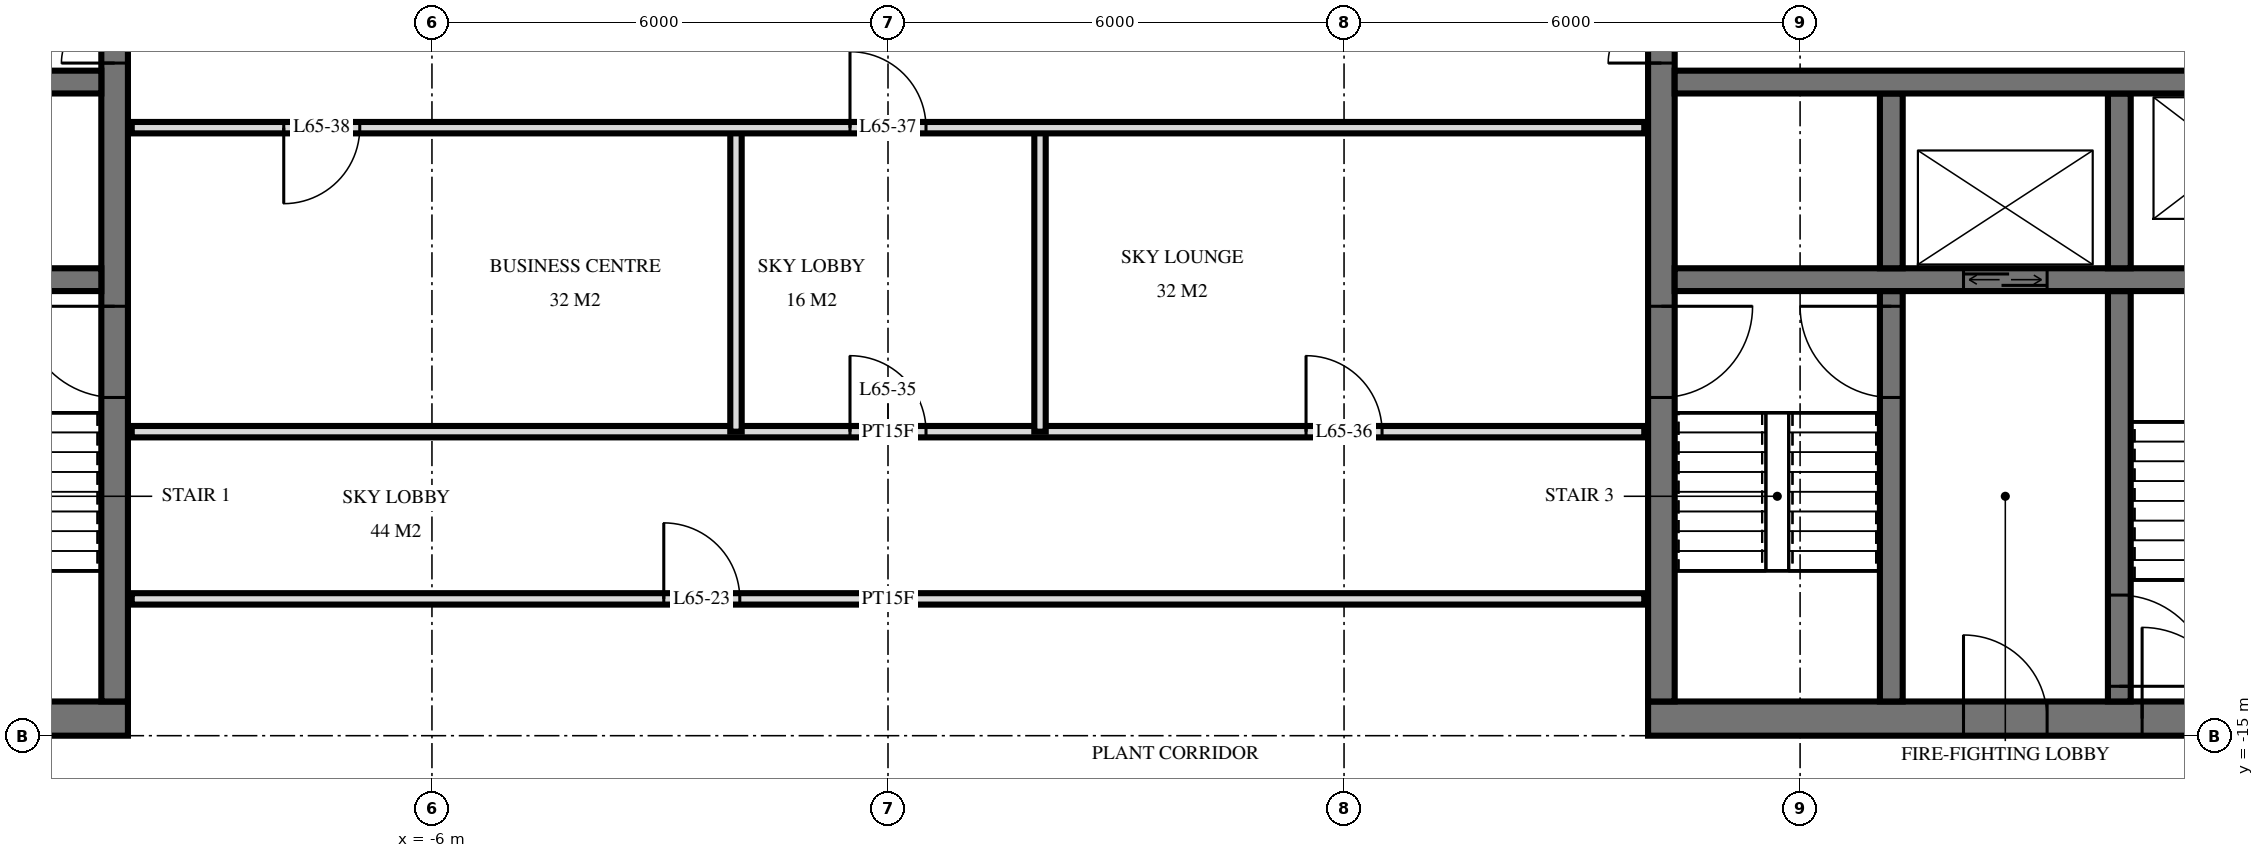
"""IFC4 building model, lengths in metres.
Left out: names, types, materials, properties, quantities, classifications, styles, units other than length and angle.
Written with IfcOpenShell. Run it as: python <this file> out.ifc"""

import sys

from ifc_helpers import new_model, si_unit, direction, frame, frame_2d, origin, place, context, subcontext, project, spatial, rectangle, extrude, element, fill, save


model = new_model("IFC4")
c1 = context("Model", 3, precision=1e-05, world=origin(), true_north=direction((0.0, 1.0)))
c2 = subcontext(c1, "Body", "Model", "MODEL_VIEW")
j1 = project(units=[si_unit("LENGTHUNIT", "METRE"), si_unit("PLANEANGLEUNIT", "RADIAN")], contexts=[c1])
p1 = place(None, origin())
s1 = spatial("IfcSite", under=j1, at=p1, CompositionType="ELEMENT")
p2 = place(p1, origin())
s2 = spatial("IfcBuilding", under=s1, at=p2, CompositionType="ELEMENT")
p3 = place(p2, frame((0.0, 0.0, 246.6)))
s3 = spatial("IfcBuildingStorey", under=s2, at=p3, CompositionType="ELEMENT", Elevation=246.6)
p4 = place(p3, frame((-19.5, -14.775, 0.0), z_axis=(0.0, 0.0, 1.0), x_axis=(1.0, 0.0, 0.0)))
e1 = element("IfcWall", 1, at=p4, inside=s3, PredefinedType="SHEAR", context=c2, shape_type="SweptSolid", body=[
    extrude(rectangle(XDim=9.5, YDim=0.45, at=frame_2d((4.75, 0.0))), origin(), (0.0, 0.0, 1.0), 6.0),
])
p5 = place(p4, frame((1.8, 0.0, 0.0)))
e2 = element("IfcOpeningElement", 2, at=p5, cuts=e1, PredefinedType="OPENING", context=c2, shape_type="SweptSolid", body=[
    extrude(rectangle(XDim=1.2, YDim=2.1, at=frame_2d((0.6, 1.05))), frame((0.0, 0.235, 0.0), z_axis=(0.0, -1.0, 0.0), x_axis=(1.0, 0.0, 0.0)), (0.0, 0.0, 1.0), 0.47),
])
p6 = place(p4, frame((4.25, 0.0, 0.0)))
e3 = element("IfcOpeningElement", 3, at=p6, cuts=e1, PredefinedType="OPENING", context=c2, shape_type="SweptSolid", body=[
    extrude(rectangle(XDim=1.1, YDim=2.1, at=frame_2d((0.55, 1.05))), frame((0.0, 0.235, 0.0), z_axis=(0.0, -1.0, 0.0), x_axis=(1.0, 0.0, 0.0)), (0.0, 0.0, 1.0), 0.47),
])
p7 = place(p3, frame((-10.175, -14.55, 0.0), z_axis=(0.0, 0.0, 1.0), x_axis=(0.0, 1.0, 0.0)))
e4 = element("IfcWall", 4, at=p7, inside=s3, PredefinedType="SHEAR", context=c2, shape_type="SweptSolid", body=[
    extrude(rectangle(XDim=14.1, YDim=0.35, at=frame_2d((7.05, 0.0))), origin(), (0.0, 0.0, 1.0), 6.0),
])
p8 = place(p7, frame((8.4, 0.0, 0.0)))
e5 = element("IfcOpeningElement", 5, at=p8, cuts=e4, PredefinedType="OPENING", context=c2, shape_type="SweptSolid", body=[
    extrude(rectangle(XDim=1.4, YDim=2.4, at=frame_2d((0.7, 1.2))), frame((0.0, 0.185, 0.0), z_axis=(0.0, -1.0, 0.0), x_axis=(1.0, 0.0, 0.0)), (0.0, 0.0, 1.0), 0.37),
])
p9 = place(p7, frame((10.0, 0.0, 0.0)))
e6 = element("IfcOpeningElement", 6, at=p9, cuts=e4, PredefinedType="OPENING", context=c2, shape_type="SweptSolid", body=[
    extrude(rectangle(XDim=1.4, YDim=2.4, at=frame_2d((0.7, 1.2))), frame((0.0, 0.185, 0.0), z_axis=(0.0, -1.0, 0.0), x_axis=(1.0, 0.0, 0.0)), (0.0, 0.0, 1.0), 0.37),
])
p10 = place(p7, frame((4.0, 0.0, 0.0)))
e7 = element("IfcOpeningElement", 7, at=p10, cuts=e4, PredefinedType="OPENING", context=c2, shape_type="SweptSolid", body=[
    extrude(rectangle(XDim=1.2, YDim=2.1, at=frame_2d((0.6, 1.05))), frame((0.0, 0.185, 0.0), z_axis=(0.0, -1.0, 0.0), x_axis=(1.0, 0.0, 0.0)), (0.0, 0.0, 1.0), 0.37),
])
p11 = place(p3, frame((-19.05, -6.4, 0.0), z_axis=(0.0, 0.0, 1.0), x_axis=(1.0, 0.0, 0.0)))
e8 = element("IfcWall", 8, at=p11, inside=s3, PredefinedType="SHEAR", context=c2, shape_type="SweptSolid", body=[
    extrude(rectangle(XDim=8.7, YDim=0.3, at=frame_2d((4.35, 0.0))), origin(), (0.0, 0.0, 1.0), 6.0),
])
p12 = place(p11, frame((0.8, 0.0, 0.0)))
e9 = element("IfcOpeningElement", 9, at=p12, cuts=e8, PredefinedType="OPENING", context=c2, shape_type="SweptSolid", body=[
    extrude(rectangle(XDim=1.1, YDim=2.1, at=frame_2d((0.55, 1.05))), frame((0.0, 0.16, 0.0), z_axis=(0.0, -1.0, 0.0), x_axis=(1.0, 0.0, 0.0)), (0.0, 0.0, 1.0), 0.32),
])
p13 = place(p3, frame((-19.05, -9.0, 0.0), z_axis=(0.0, 0.0, 1.0), x_axis=(1.0, 0.0, 0.0)))
e10 = element("IfcWall", 10, at=p13, inside=s3, PredefinedType="SHEAR", context=c2, shape_type="SweptSolid", body=[
    extrude(rectangle(XDim=8.7, YDim=0.3, at=frame_2d((4.35, 0.0))), origin(), (0.0, 0.0, 1.0), 6.0),
])
p14 = place(p13, frame((3.8, 0.0, 0.0)))
e11 = element("IfcOpeningElement", 11, at=p14, cuts=e10, PredefinedType="OPENING", context=c2, shape_type="SweptSolid", body=[
    extrude(rectangle(XDim=1.1, YDim=2.1, at=frame_2d((0.55, 1.05))), frame((0.0, 0.16, 0.0), z_axis=(0.0, -1.0, 0.0), x_axis=(1.0, 0.0, 0.0)), (0.0, 0.0, 1.0), 0.32),
])
p15 = place(p3, frame((10.0, -14.775, 0.0), z_axis=(0.0, 0.0, 1.0), x_axis=(1.0, 0.0, 0.0)))
e12 = element("IfcWall", 12, at=p15, inside=s3, PredefinedType="SHEAR", context=c2, shape_type="SweptSolid", body=[
    extrude(rectangle(XDim=9.5, YDim=0.45, at=frame_2d((4.75, 0.0))), origin(), (0.0, 0.0, 1.0), 6.0),
])
p16 = place(p15, frame((6.5, 0.0, 0.0)))
e13 = element("IfcOpeningElement", 13, at=p16, cuts=e12, PredefinedType="OPENING", context=c2, shape_type="SweptSolid", body=[
    extrude(rectangle(XDim=1.2, YDim=2.1, at=frame_2d((0.6, 1.05))), frame((0.0, 0.235, 0.0), z_axis=(0.0, -1.0, 0.0), x_axis=(1.0, 0.0, 0.0)), (0.0, 0.0, 1.0), 0.47),
])
p17 = place(p15, frame((4.15, 0.0, 0.0)))
e14 = element("IfcOpeningElement", 14, at=p17, cuts=e12, PredefinedType="OPENING", context=c2, shape_type="SweptSolid", body=[
    extrude(rectangle(XDim=1.1, YDim=2.1, at=frame_2d((0.55, 1.05))), frame((0.0, 0.235, 0.0), z_axis=(0.0, -1.0, 0.0), x_axis=(1.0, 0.0, 0.0)), (0.0, 0.0, 1.0), 0.47),
])
p18 = place(p3, frame((10.175, -14.55, 0.0), z_axis=(0.0, 0.0, 1.0), x_axis=(0.0, 1.0, 0.0)))
e15 = element("IfcWall", 15, at=p18, inside=s3, PredefinedType="SHEAR", context=c2, shape_type="SweptSolid", body=[
    extrude(rectangle(XDim=14.1, YDim=0.35, at=frame_2d((7.05, 0.0))), origin(), (0.0, 0.0, 1.0), 6.0),
])
p19 = place(p18, frame((8.4, 0.0, 0.0)))
e16 = element("IfcOpeningElement", 16, at=p19, cuts=e15, PredefinedType="OPENING", context=c2, shape_type="SweptSolid", body=[
    extrude(rectangle(XDim=1.4, YDim=2.4, at=frame_2d((0.7, 1.2))), frame((0.0, 0.185, 0.0), z_axis=(0.0, -1.0, 0.0), x_axis=(1.0, 0.0, 0.0)), (0.0, 0.0, 1.0), 0.37),
])
p20 = place(p18, frame((10.0, 0.0, 0.0)))
e17 = element("IfcOpeningElement", 17, at=p20, cuts=e15, PredefinedType="OPENING", context=c2, shape_type="SweptSolid", body=[
    extrude(rectangle(XDim=1.4, YDim=2.4, at=frame_2d((0.7, 1.2))), frame((0.0, 0.185, 0.0), z_axis=(0.0, -1.0, 0.0), x_axis=(1.0, 0.0, 0.0)), (0.0, 0.0, 1.0), 0.37),
])
p21 = place(p18, frame((4.0, 0.0, 0.0)))
e18 = element("IfcOpeningElement", 18, at=p21, cuts=e15, PredefinedType="OPENING", context=c2, shape_type="SweptSolid", body=[
    extrude(rectangle(XDim=1.2, YDim=2.1, at=frame_2d((0.6, 1.05))), frame((0.0, 0.185, 0.0), z_axis=(0.0, -1.0, 0.0), x_axis=(1.0, 0.0, 0.0)), (0.0, 0.0, 1.0), 0.37),
])
p22 = place(p3, frame((10.35, -6.4, 0.0), z_axis=(0.0, 0.0, 1.0), x_axis=(1.0, 0.0, 0.0)))
e19 = element("IfcWall", 19, at=p22, inside=s3, PredefinedType="SHEAR", context=c2, shape_type="SweptSolid", body=[
    extrude(rectangle(XDim=8.7, YDim=0.3, at=frame_2d((4.35, 0.0))), origin(), (0.0, 0.0, 1.0), 6.0),
])
p23 = place(p22, frame((6.8, 0.0, 0.0)))
e20 = element("IfcOpeningElement", 20, at=p23, cuts=e19, PredefinedType="OPENING", context=c2, shape_type="SweptSolid", body=[
    extrude(rectangle(XDim=1.1, YDim=2.1, at=frame_2d((0.55, 1.05))), frame((0.0, 0.16, 0.0), z_axis=(0.0, -1.0, 0.0), x_axis=(1.0, 0.0, 0.0)), (0.0, 0.0, 1.0), 0.32),
])
p24 = place(p3, frame((10.35, -9.0, 0.0), z_axis=(0.0, 0.0, 1.0), x_axis=(1.0, 0.0, 0.0)))
e21 = element("IfcWall", 21, at=p24, inside=s3, PredefinedType="SHEAR", context=c2, shape_type="SweptSolid", body=[
    extrude(rectangle(XDim=8.7, YDim=0.3, at=frame_2d((4.35, 0.0))), origin(), (0.0, 0.0, 1.0), 6.0),
])
p25 = place(p24, frame((3.8, 0.0, 0.0)))
e22 = element("IfcOpeningElement", 22, at=p25, cuts=e21, PredefinedType="OPENING", context=c2, shape_type="SweptSolid", body=[
    extrude(rectangle(XDim=1.1, YDim=2.1, at=frame_2d((0.55, 1.05))), frame((0.0, 0.16, 0.0), z_axis=(0.0, -1.0, 0.0), x_axis=(1.0, 0.0, 0.0)), (0.0, 0.0, 1.0), 0.32),
])
p26 = place(p3, frame((13.2, -8.85, 0.0), z_axis=(0.0, 0.0, 1.0), x_axis=(0.0, 1.0, 0.0)))
e23 = element("IfcWall", 23, at=p26, inside=s3, PredefinedType="SHEAR", context=c2, shape_type="SweptSolid", body=[
    extrude(rectangle(XDim=2.3, YDim=0.3, at=frame_2d((1.15, 0.0))), origin(), (0.0, 0.0, 1.0), 6.0),
])
p27 = place(p3, frame((13.2, -14.55, 0.0), z_axis=(0.0, 0.0, 1.0), x_axis=(0.0, 1.0, 0.0)))
e24 = element("IfcWall", 24, at=p27, inside=s3, PredefinedType="SHEAR", context=c2, shape_type="SweptSolid", body=[
    extrude(rectangle(XDim=5.4, YDim=0.3, at=frame_2d((2.7, 0.0))), origin(), (0.0, 0.0, 1.0), 6.0),
])
p28 = place(p27, frame((4.0, 0.0, 0.0)))
e25 = element("IfcOpeningElement", 25, at=p28, cuts=e24, PredefinedType="OPENING", context=c2, shape_type="SweptSolid", body=[
    extrude(rectangle(XDim=1.2, YDim=2.1, at=frame_2d((0.6, 1.05))), frame((0.0, 0.16, 0.0), z_axis=(0.0, -1.0, 0.0), x_axis=(1.0, 0.0, 0.0)), (0.0, 0.0, 1.0), 0.32),
])
p29 = place(p3, frame((16.2, -8.85, 0.0), z_axis=(0.0, 0.0, 1.0), x_axis=(0.0, 1.0, 0.0)))
e26 = element("IfcWall", 26, at=p29, inside=s3, PredefinedType="SHEAR", context=c2, shape_type="SweptSolid", body=[
    extrude(rectangle(XDim=2.3, YDim=0.3, at=frame_2d((1.15, 0.0))), origin(), (0.0, 0.0, 1.0), 6.0),
])
p30 = place(p3, frame((16.2, -14.55, 0.0), z_axis=(0.0, 0.0, 1.0), x_axis=(0.0, 1.0, 0.0)))
e27 = element("IfcWall", 27, at=p30, inside=s3, PredefinedType="SHEAR", context=c2, shape_type="SweptSolid", body=[
    extrude(rectangle(XDim=5.4, YDim=0.3, at=frame_2d((2.7, 0.0))), origin(), (0.0, 0.0, 1.0), 6.0),
])
p31 = place(p30, frame((0.2, 0.0, 0.0)))
e28 = element("IfcOpeningElement", 28, at=p31, cuts=e27, PredefinedType="OPENING", context=c2, shape_type="SweptSolid", body=[
    extrude(rectangle(XDim=1.2, YDim=2.1, at=frame_2d((0.6, 1.05))), frame((0.0, 0.16, 0.0), z_axis=(0.0, -1.0, 0.0), x_axis=(1.0, 0.0, 0.0)), (0.0, 0.0, 1.0), 0.32),
])
for number, where, z_axis, x_axis in (
    (29, (2.0, -11.0, 0.0), (0.0, 0.0, 1.0), (0.0, 1.0, 0.0)),
    (30, (-2.0, -11.0, 0.0), (0.0, 0.0, 1.0), (0.0, 1.0, 0.0)),
):
    element("IfcWall", number, at=place(p3, frame(where, z_axis=z_axis, x_axis=x_axis)), inside=s3, PredefinedType="PARTITIONING", context=c2, shape_type="SweptSolid", body=[
        extrude(rectangle(XDim=4.0, YDim=0.15, at=frame_2d((2.0, 0.0))), origin(), (0.0, 0.0, 1.0), 5.7),
    ])
p32 = place(p3, frame((-9.95, -13.2, 0.0), z_axis=(0.0, 0.0, 1.0), x_axis=(1.0, 0.0, 0.0)))
e31 = element("IfcWall", 31, at=p32, inside=s3, PredefinedType="PARTITIONING", context=c2, shape_type="SweptSolid", body=[
    extrude(rectangle(XDim=19.9, YDim=0.15, at=frame_2d((9.95, 0.0))), origin(), (0.0, 0.0, 1.0), 5.7),
])
p33 = place(p32, frame((7.0, 0.0, 0.0)))
e32 = element("IfcOpeningElement", 32, at=p33, cuts=e31, PredefinedType="OPENING", context=c2, shape_type="SweptSolid", body=[
    extrude(rectangle(XDim=1.0, YDim=2.1, at=frame_2d((0.5, 1.05))), frame((0.0, 0.085, 0.0), z_axis=(0.0, -1.0, 0.0), x_axis=(1.0, 0.0, 0.0)), (0.0, 0.0, 1.0), 0.17),
])
p34 = place(p3, frame((-9.95, -11.0, 0.0), z_axis=(0.0, 0.0, 1.0), x_axis=(1.0, 0.0, 0.0)))
e33 = element("IfcWall", 33, at=p34, inside=s3, PredefinedType="PARTITIONING", context=c2, shape_type="SweptSolid", body=[
    extrude(rectangle(XDim=19.9, YDim=0.15, at=frame_2d((9.95, 0.0))), origin(), (0.0, 0.0, 1.0), 5.7),
])
p35 = place(p34, frame((9.45, 0.0, 0.0)))
e34 = element("IfcOpeningElement", 34, at=p35, cuts=e33, PredefinedType="OPENING", context=c2, shape_type="SweptSolid", body=[
    extrude(rectangle(XDim=1.0, YDim=2.1, at=frame_2d((0.5, 1.05))), frame((0.0, 0.085, 0.0), z_axis=(0.0, -1.0, 0.0), x_axis=(1.0, 0.0, 0.0)), (0.0, 0.0, 1.0), 0.17),
])
p36 = place(p34, frame((15.45, 0.0, 0.0)))
e35 = element("IfcOpeningElement", 35, at=p36, cuts=e33, PredefinedType="OPENING", context=c2, shape_type="SweptSolid", body=[
    extrude(rectangle(XDim=1.0, YDim=2.1, at=frame_2d((0.5, 1.05))), frame((0.0, 0.085, 0.0), z_axis=(0.0, -1.0, 0.0), x_axis=(1.0, 0.0, 0.0)), (0.0, 0.0, 1.0), 0.17),
])
p37 = place(p3, frame((-9.95, -7.0, 0.0), z_axis=(0.0, 0.0, 1.0), x_axis=(1.0, 0.0, 0.0)))
e36 = element("IfcWall", 36, at=p37, inside=s3, PredefinedType="PARTITIONING", context=c2, shape_type="SweptSolid", body=[
    extrude(rectangle(XDim=19.9, YDim=0.15, at=frame_2d((9.95, 0.0))), origin(), (0.0, 0.0, 1.0), 5.7),
])
p38 = place(p37, frame((9.45, 0.0, 0.0)))
e37 = element("IfcOpeningElement", 37, at=p38, cuts=e36, PredefinedType="OPENING", context=c2, shape_type="SweptSolid", body=[
    extrude(rectangle(XDim=1.0, YDim=2.1, at=frame_2d((0.5, 1.05))), frame((0.0, 0.085, 0.0), z_axis=(0.0, -1.0, 0.0), x_axis=(1.0, 0.0, 0.0)), (0.0, 0.0, 1.0), 0.17),
])
p39 = place(p37, frame((2.0, 0.0, 0.0)))
e38 = element("IfcOpeningElement", 38, at=p39, cuts=e36, PredefinedType="OPENING", context=c2, shape_type="SweptSolid", body=[
    extrude(rectangle(XDim=1.0, YDim=2.1, at=frame_2d((0.5, 1.05))), frame((0.0, 0.085, 0.0), z_axis=(0.0, -1.0, 0.0), x_axis=(1.0, 0.0, 0.0)), (0.0, 0.0, 1.0), 0.17),
])
p40 = place(p25, origin())
e39 = element("IfcDoor", 39, at=p40, inside=s3, OperationType="DOUBLE_DOOR_SLIDING", PredefinedType="USERDEFINED", context=c2, shape_type="SweptSolid", body=[
    extrude(rectangle(XDim=1.1, YDim=2.1, at=frame_2d((0.55, 1.05))), frame((0.0, 0.025, 0.0), z_axis=(0.0, -1.0, 0.0), x_axis=(1.0, 0.0, 0.0)), (0.0, 0.0, 1.0), 0.05),
])
fill(e22, e39)
p41 = place(p8, origin())
e40 = element("IfcDoor", 40, at=p41, inside=s3, OperationType="DOUBLE_DOOR_SINGLE_SWING", PredefinedType="DOOR", context=c2, shape_type="SweptSolid", body=[
    extrude(rectangle(XDim=1.4, YDim=2.4, at=frame_2d((0.7, 1.2))), frame((0.0, 0.025, 0.0), z_axis=(0.0, -1.0, 0.0), x_axis=(1.0, 0.0, 0.0)), (0.0, 0.0, 1.0), 0.05),
])
fill(e5, e40)
p42 = place(p10, origin())
e41 = element("IfcDoor", 41, at=p42, inside=s3, OperationType="SINGLE_SWING_LEFT", PredefinedType="DOOR", context=c2, shape_type="SweptSolid", body=[
    extrude(rectangle(XDim=1.2, YDim=2.1, at=frame_2d((0.6, 1.05))), frame((0.0, 0.025, 0.0), z_axis=(0.0, -1.0, 0.0), x_axis=(1.0, 0.0, 0.0)), (0.0, 0.0, 1.0), 0.05),
])
fill(e7, e41)
p43 = place(p19, origin())
e42 = element("IfcDoor", 42, at=p43, inside=s3, OperationType="DOUBLE_DOOR_SINGLE_SWING", PredefinedType="DOOR", context=c2, shape_type="SweptSolid", body=[
    extrude(rectangle(XDim=1.4, YDim=2.4, at=frame_2d((0.7, 1.2))), frame((0.0, 0.025, 0.0), z_axis=(0.0, -1.0, 0.0), x_axis=(1.0, 0.0, 0.0)), (0.0, 0.0, 1.0), 0.05),
])
fill(e16, e42)
p44 = place(p21, frame((0.6, 0.0, 0.0), z_axis=(0.0, 0.0, 1.0), x_axis=(-1.0, 0.0, 0.0)))
e43 = element("IfcDoor", 43, at=p44, inside=s3, OperationType="SINGLE_SWING_RIGHT", PredefinedType="DOOR", context=c2, shape_type="SweptSolid", body=[
    extrude(rectangle(XDim=1.2, YDim=2.1, at=frame_2d((0.0, 1.05))), frame((0.0, -0.025, 0.0), z_axis=(0.0, 1.0, 0.0), x_axis=(-1.0, 0.0, 0.0)), (0.0, 0.0, 1.0), 0.05),
])
fill(e18, e43)
p45 = place(p16, origin())
e44 = element("IfcDoor", 44, at=p45, inside=s3, OperationType="SINGLE_SWING_RIGHT", PredefinedType="DOOR", context=c2, shape_type="SweptSolid", body=[
    extrude(rectangle(XDim=1.2, YDim=2.1, at=frame_2d((0.6, 1.05))), frame((0.0, 0.025, 0.0), z_axis=(0.0, -1.0, 0.0), x_axis=(1.0, 0.0, 0.0)), (0.0, 0.0, 1.0), 0.05),
])
fill(e13, e44)
p46 = place(p17, origin())
e45 = element("IfcDoor", 45, at=p46, inside=s3, OperationType="SINGLE_SWING_RIGHT", PredefinedType="DOOR", context=c2, shape_type="SweptSolid", body=[
    extrude(rectangle(XDim=1.1, YDim=2.1, at=frame_2d((0.55, 1.05))), frame((0.0, 0.025, 0.0), z_axis=(0.0, -1.0, 0.0), x_axis=(1.0, 0.0, 0.0)), (0.0, 0.0, 1.0), 0.05),
])
fill(e14, e45)
p47 = place(p28, origin())
e46 = element("IfcDoor", 46, at=p47, inside=s3, OperationType="SINGLE_SWING_LEFT", PredefinedType="DOOR", context=c2, shape_type="SweptSolid", body=[
    extrude(rectangle(XDim=1.2, YDim=2.1, at=frame_2d((0.6, 1.05))), frame((0.0, 0.025, 0.0), z_axis=(0.0, -1.0, 0.0), x_axis=(1.0, 0.0, 0.0)), (0.0, 0.0, 1.0), 0.05),
])
fill(e25, e46)
p48 = place(p31, frame((0.6, 0.0, 0.0), z_axis=(0.0, 0.0, 1.0), x_axis=(-1.0, 0.0, 0.0)))
e47 = element("IfcDoor", 47, at=p48, inside=s3, OperationType="SINGLE_SWING_LEFT", PredefinedType="DOOR", context=c2, shape_type="SweptSolid", body=[
    extrude(rectangle(XDim=1.2, YDim=2.1, at=frame_2d((0.0, 1.05))), frame((0.0, -0.025, 0.0), z_axis=(0.0, 1.0, 0.0), x_axis=(-1.0, 0.0, 0.0)), (0.0, 0.0, 1.0), 0.05),
])
fill(e28, e47)
p49 = place(p33, origin())
e48 = element("IfcDoor", 48, at=p49, inside=s3, OperationType="SINGLE_SWING_RIGHT", PredefinedType="DOOR", context=c2, shape_type="SweptSolid", body=[
    extrude(rectangle(XDim=1.0, YDim=2.1, at=frame_2d((0.5, 1.05))), frame((0.0, 0.025, 0.0), z_axis=(0.0, -1.0, 0.0), x_axis=(1.0, 0.0, 0.0)), (0.0, 0.0, 1.0), 0.05),
])
fill(e32, e48)
p50 = place(p35, origin())
e49 = element("IfcDoor", 49, at=p50, inside=s3, OperationType="SINGLE_SWING_RIGHT", PredefinedType="DOOR", context=c2, shape_type="SweptSolid", body=[
    extrude(rectangle(XDim=1.0, YDim=2.1, at=frame_2d((0.5, 1.05))), frame((0.0, 0.025, 0.0), z_axis=(0.0, -1.0, 0.0), x_axis=(1.0, 0.0, 0.0)), (0.0, 0.0, 1.0), 0.05),
])
fill(e34, e49)
p51 = place(p36, origin())
e50 = element("IfcDoor", 50, at=p51, inside=s3, OperationType="SINGLE_SWING_RIGHT", PredefinedType="DOOR", context=c2, shape_type="SweptSolid", body=[
    extrude(rectangle(XDim=1.0, YDim=2.1, at=frame_2d((0.5, 1.05))), frame((0.0, 0.025, 0.0), z_axis=(0.0, -1.0, 0.0), x_axis=(1.0, 0.0, 0.0)), (0.0, 0.0, 1.0), 0.05),
])
fill(e35, e50)
p52 = place(p38, origin())
e51 = element("IfcDoor", 51, at=p52, inside=s3, OperationType="SINGLE_SWING_RIGHT", PredefinedType="DOOR", context=c2, shape_type="SweptSolid", body=[
    extrude(rectangle(XDim=1.0, YDim=2.1, at=frame_2d((0.5, 1.05))), frame((0.0, 0.025, 0.0), z_axis=(0.0, -1.0, 0.0), x_axis=(1.0, 0.0, 0.0)), (0.0, 0.0, 1.0), 0.05),
])
fill(e37, e51)
p53 = place(p39, frame((0.5, 0.0, 0.0), z_axis=(0.0, 0.0, 1.0), x_axis=(-1.0, 0.0, 0.0)))
e52 = element("IfcDoor", 52, at=p53, inside=s3, OperationType="SINGLE_SWING_LEFT", PredefinedType="DOOR", context=c2, shape_type="SweptSolid", body=[
    extrude(rectangle(XDim=1.0, YDim=2.1, at=frame_2d((0.0, 1.05))), frame((0.0, -0.025, 0.0), z_axis=(0.0, 1.0, 0.0), x_axis=(-1.0, 0.0, 0.0)), (0.0, 0.0, 1.0), 0.05),
])
fill(e38, e52)
save(model, sys.argv[1])
